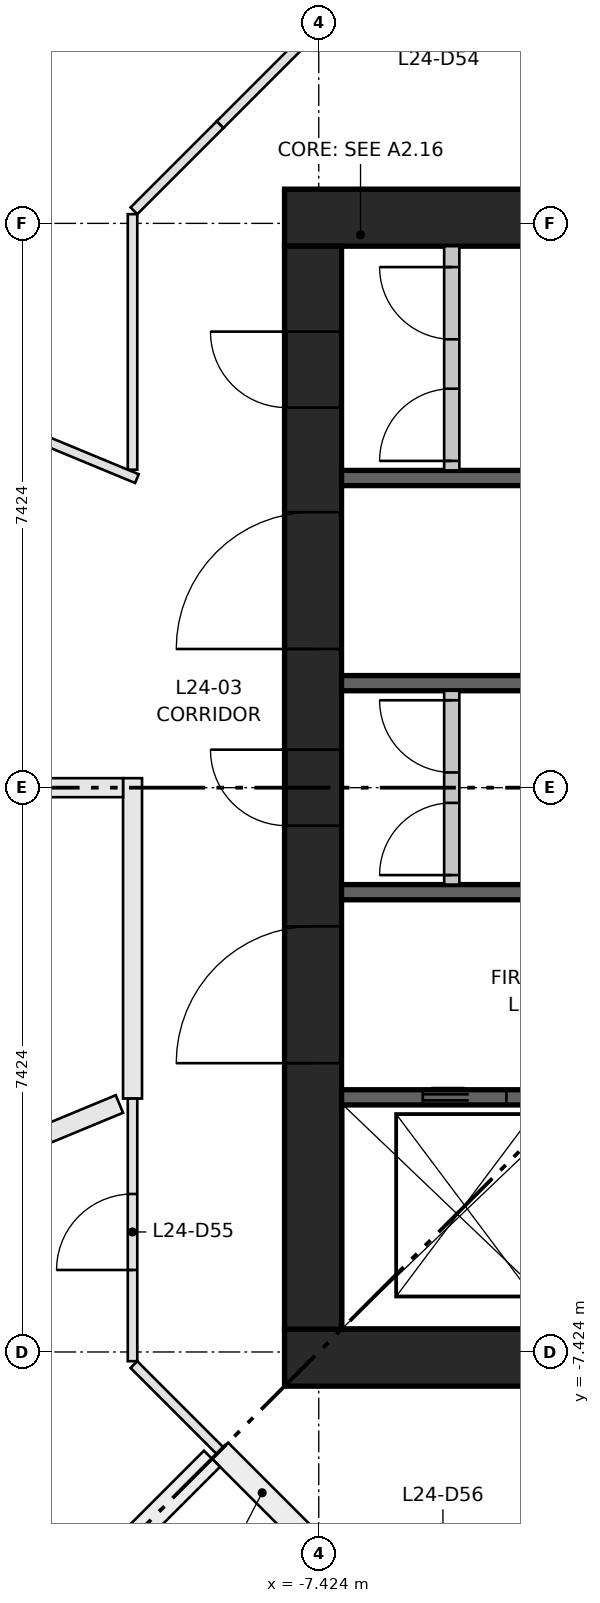
"""IFC4 building model, lengths in metres.
Left out: names, types, materials, properties, quantities, classifications, styles, units other than length and angle.
Written with IfcOpenShell. Run it as: python <this file> out.ifc"""

import sys

from ifc_helpers import new_model, si_unit, direction, frame, frame_2d, origin, place, context, subcontext, project, spatial, rectangle, extrude, element, fill, save


model = new_model("IFC4")
c1 = context("Model", 3, precision=1e-05, world=origin(), true_north=direction((0.0, 1.0)))
c2 = subcontext(c1, "Body", "Model", "MODEL_VIEW")
j1 = project(units=[si_unit("LENGTHUNIT", "METRE"), si_unit("PLANEANGLEUNIT", "RADIAN")], contexts=[c1])
p1 = place(None, origin())
s1 = spatial("IfcSite", under=j1, at=p1, CompositionType="ELEMENT")
p2 = place(p1, origin())
s2 = spatial("IfcBuilding", under=s1, at=p2, CompositionType="ELEMENT")
p3 = place(p2, frame((0.0, 0.0, 94.65)))
s3 = spatial("IfcBuildingStorey", under=s2, at=p3, CompositionType="ELEMENT", Elevation=94.65)
for number, where, z_axis, x_axis in (
    (1, (-7.874, -7.499, 0.0), (0.0, 0.0, 1.0), (1.0, 0.0, 0.0)),
    (2, (-7.874, 7.499, 0.0), (0.0, 0.0, 1.0), (1.0, 0.0, 0.0)),
):
    element("IfcWall", number, at=place(p3, frame(where, z_axis=z_axis, x_axis=x_axis)), inside=s3, PredefinedType="SHEAR", context=c2, shape_type="SweptSolid", body=[
        extrude(rectangle(XDim=15.748, YDim=0.75, at=frame_2d((7.874, 0.0))), origin(), (0.0, 0.0, 1.0), 3.65),
    ])
p4 = place(p3, frame((-7.499, -7.124, 0.0), z_axis=(0.0, 0.0, 1.0), x_axis=(0.0, 1.0, 0.0)))
e3 = element("IfcWall", 3, at=p4, inside=s3, PredefinedType="SHEAR", context=c2, shape_type="SweptSolid", body=[
    extrude(rectangle(XDim=14.248, YDim=0.75, at=frame_2d((7.124, 0.0))), origin(), (0.0, 0.0, 1.0), 3.65),
])
p5 = place(p4, frame((6.624, 0.0, 0.0)))
e4 = element("IfcOpeningElement", 4, at=p5, cuts=e3, PredefinedType="OPENING", context=c2, shape_type="SweptSolid", body=[
    extrude(rectangle(XDim=1.0, YDim=2.1, at=frame_2d((0.5, 1.05))), frame((0.0, 0.385, 0.0), z_axis=(0.0, -1.0, 0.0), x_axis=(1.0, 0.0, 0.0)), (0.0, 0.0, 1.0), 0.77),
])
p6 = place(p4, frame((3.5, 0.0, 0.0)))
e5 = element("IfcOpeningElement", 5, at=p6, cuts=e3, PredefinedType="OPENING", context=c2, shape_type="SweptSolid", body=[
    extrude(rectangle(XDim=1.8, YDim=2.1, at=frame_2d((0.9, 1.05))), frame((0.0, 0.385, 0.0), z_axis=(0.0, -1.0, 0.0), x_axis=(1.0, 0.0, 0.0)), (0.0, 0.0, 1.0), 0.77),
])
p7 = place(p4, frame((8.948, 0.0, 0.0)))
e6 = element("IfcOpeningElement", 6, at=p7, cuts=e3, PredefinedType="OPENING", context=c2, shape_type="SweptSolid", body=[
    extrude(rectangle(XDim=1.8, YDim=2.1, at=frame_2d((0.9, 1.05))), frame((0.0, 0.385, 0.0), z_axis=(0.0, -1.0, 0.0), x_axis=(1.0, 0.0, 0.0)), (0.0, 0.0, 1.0), 0.77),
])
p8 = place(p4, frame((12.124, 0.0, 0.0)))
e7 = element("IfcOpeningElement", 7, at=p8, cuts=e3, PredefinedType="OPENING", context=c2, shape_type="SweptSolid", body=[
    extrude(rectangle(XDim=1.0, YDim=2.1, at=frame_2d((0.5, 1.05))), frame((0.0, 0.385, 0.0), z_axis=(0.0, -1.0, 0.0), x_axis=(1.0, 0.0, 0.0)), (0.0, 0.0, 1.0), 0.77),
])
p9 = place(p3, frame((-7.124, -4.074, 0.0), z_axis=(0.0, 0.0, 1.0), x_axis=(1.0, 0.0, 0.0)))
e8 = element("IfcWall", 8, at=p9, inside=s3, PredefinedType="SHEAR", context=c2, shape_type="SweptSolid", body=[
    extrude(rectangle(XDim=14.248, YDim=0.2, at=frame_2d((7.124, 0.0))), origin(), (0.0, 0.0, 1.0), 3.3),
])
p10 = place(p9, frame((1.069, 0.0, 0.0)))
e9 = element("IfcOpeningElement", 9, at=p10, cuts=e8, PredefinedType="OPENING", context=c2, shape_type="SweptSolid", body=[
    extrude(rectangle(XDim=1.1, YDim=2.1, at=frame_2d((0.55, 1.05))), frame((0.0, 0.11, 0.0), z_axis=(0.0, -1.0, 0.0), x_axis=(1.0, 0.0, 0.0)), (0.0, 0.0, 1.0), 0.22),
])
p11 = place(p9, frame((4.206, 0.0, 0.0)))
e10 = element("IfcOpeningElement", 10, at=p11, cuts=e8, PredefinedType="OPENING", context=c2, shape_type="SweptSolid", body=[
    extrude(rectangle(XDim=1.1, YDim=2.1, at=frame_2d((0.55, 1.05))), frame((0.0, 0.11, 0.0), z_axis=(0.0, -1.0, 0.0), x_axis=(1.0, 0.0, 0.0)), (0.0, 0.0, 1.0), 0.22),
])
p12 = place(p9, frame((6.808, 0.0, 0.0)))
e11 = element("IfcOpeningElement", 11, at=p12, cuts=e8, PredefinedType="OPENING", context=c2, shape_type="SweptSolid", body=[
    extrude(rectangle(XDim=1.0, YDim=2.1, at=frame_2d((0.5, 1.05))), frame((0.0, 0.11, 0.0), z_axis=(0.0, -1.0, 0.0), x_axis=(1.0, 0.0, 0.0)), (0.0, 0.0, 1.0), 0.22),
])
p13 = place(p9, frame((8.777, 0.0, 0.0)))
e12 = element("IfcOpeningElement", 12, at=p13, cuts=e8, PredefinedType="OPENING", context=c2, shape_type="SweptSolid", body=[
    extrude(rectangle(XDim=1.0, YDim=2.1, at=frame_2d((0.5, 1.05))), frame((0.0, 0.11, 0.0), z_axis=(0.0, -1.0, 0.0), x_axis=(1.0, 0.0, 0.0)), (0.0, 0.0, 1.0), 0.22),
])
p14 = place(p9, frame((10.745, 0.0, 0.0)))
e13 = element("IfcOpeningElement", 13, at=p14, cuts=e8, PredefinedType="OPENING", context=c2, shape_type="SweptSolid", body=[
    extrude(rectangle(XDim=1.0, YDim=2.1, at=frame_2d((0.5, 1.05))), frame((0.0, 0.11, 0.0), z_axis=(0.0, -1.0, 0.0), x_axis=(1.0, 0.0, 0.0)), (0.0, 0.0, 1.0), 0.22),
])
p15 = place(p9, frame((12.714, 0.0, 0.0)))
e14 = element("IfcOpeningElement", 14, at=p15, cuts=e8, PredefinedType="OPENING", context=c2, shape_type="SweptSolid", body=[
    extrude(rectangle(XDim=1.0, YDim=2.1, at=frame_2d((0.5, 1.05))), frame((0.0, 0.11, 0.0), z_axis=(0.0, -1.0, 0.0), x_axis=(1.0, 0.0, 0.0)), (0.0, 0.0, 1.0), 0.22),
])
p16 = place(p3, frame((-7.124, 4.074, 0.0), z_axis=(0.0, 0.0, 1.0), x_axis=(1.0, 0.0, 0.0)))
e15 = element("IfcWall", 15, at=p16, inside=s3, PredefinedType="SHEAR", context=c2, shape_type="SweptSolid", body=[
    extrude(rectangle(XDim=7.124, YDim=0.2, at=frame_2d((3.562, 0.0))), origin(), (0.0, 0.0, 1.0), 3.3),
])
for number, where, z_axis, x_axis in (
    (16, (-7.124, -1.375, 0.0), (0.0, 0.0, 1.0), (1.0, 0.0, 0.0)),
    (17, (-7.124, 1.375, 0.0), (0.0, 0.0, 1.0), (1.0, 0.0, 0.0)),
):
    element("IfcWall", number, at=place(p3, frame(where, z_axis=z_axis, x_axis=x_axis)), inside=s3, PredefinedType="SHEAR", context=c2, shape_type="SweptSolid", body=[
        extrude(rectangle(XDim=2.75, YDim=0.2, at=frame_2d((1.375, 0.0))), origin(), (0.0, 0.0, 1.0), 3.3),
    ])
p17 = place(p3, frame((-5.674, -1.275, 0.0), z_axis=(0.0, 0.0, 1.0), x_axis=(0.0, 1.0, 0.0)))
e18 = element("IfcWall", 18, at=p17, inside=s3, PredefinedType="PARTITIONING", context=c2, shape_type="SweptSolid", body=[
    extrude(rectangle(XDim=2.55, YDim=0.2, at=frame_2d((1.275, 0.0))), origin(), (0.0, 0.0, 1.0), 3.3),
])
p18 = place(p17, frame((0.125, 0.0, 0.0)))
e19 = element("IfcOpeningElement", 19, at=p18, cuts=e18, PredefinedType="OPENING", context=c2, shape_type="SweptSolid", body=[
    extrude(rectangle(XDim=0.95, YDim=2.1, at=frame_2d((0.475, 1.05))), frame((0.0, 0.11, 0.0), z_axis=(0.0, -1.0, 0.0), x_axis=(1.0, 0.0, 0.0)), (0.0, 0.0, 1.0), 0.22),
])
p19 = place(p17, frame((1.475, 0.0, 0.0)))
e20 = element("IfcOpeningElement", 20, at=p19, cuts=e18, PredefinedType="OPENING", context=c2, shape_type="SweptSolid", body=[
    extrude(rectangle(XDim=0.95, YDim=2.1, at=frame_2d((0.475, 1.05))), frame((0.0, 0.11, 0.0), z_axis=(0.0, -1.0, 0.0), x_axis=(1.0, 0.0, 0.0)), (0.0, 0.0, 1.0), 0.22),
])
p20 = place(p3, frame((-5.674, 4.174, 0.0), z_axis=(0.0, 0.0, 1.0), x_axis=(0.0, 1.0, 0.0)))
e21 = element("IfcWall", 21, at=p20, inside=s3, PredefinedType="PARTITIONING", context=c2, shape_type="SweptSolid", body=[
    extrude(rectangle(XDim=2.95, YDim=0.2, at=frame_2d((1.475, 0.0))), origin(), (0.0, 0.0, 1.0), 3.3),
])
p21 = place(p20, frame((0.125, 0.0, 0.0)))
e22 = element("IfcOpeningElement", 22, at=p21, cuts=e21, PredefinedType="OPENING", context=c2, shape_type="SweptSolid", body=[
    extrude(rectangle(XDim=0.95, YDim=2.1, at=frame_2d((0.475, 1.05))), frame((0.0, 0.11, 0.0), z_axis=(0.0, -1.0, 0.0), x_axis=(1.0, 0.0, 0.0)), (0.0, 0.0, 1.0), 0.22),
])
p22 = place(p20, frame((1.725, 0.0, 0.0)))
e23 = element("IfcOpeningElement", 23, at=p22, cuts=e21, PredefinedType="OPENING", context=c2, shape_type="SweptSolid", body=[
    extrude(rectangle(XDim=0.95, YDim=2.1, at=frame_2d((0.475, 1.05))), frame((0.0, 0.11, 0.0), z_axis=(0.0, -1.0, 0.0), x_axis=(1.0, 0.0, 0.0)), (0.0, 0.0, 1.0), 0.22),
])
p23 = place(p3, frame((-8.722, 8.722, 0.0), z_axis=(0.0, 0.0, 1.0), x_axis=(0.707030604857, 0.70718294931, 0.0)))
e24 = element("IfcWall", 24, at=p23, inside=s3, PredefinedType="PARTITIONING", context=c2, shape_type="SweptSolid", body=[
    extrude(rectangle(XDim=1.603, YDim=0.125, at=frame_2d((0.801, 0.0))), origin(), (0.0, 0.0, 1.0), 3.3),
])
p24 = place(p3, frame((-9.874, 4.183, 0.0), z_axis=(0.0, 0.0, 1.0), x_axis=(0.0, 1.0, 0.0)))
e25 = element("IfcWall", 25, at=p24, inside=s3, PredefinedType="PARTITIONING", context=c2, shape_type="SweptSolid", body=[
    extrude(rectangle(XDim=3.362, YDim=0.125, at=frame_2d((1.681, 0.0))), origin(), (0.0, 0.0, 1.0), 3.3),
])
p25 = place(p3, frame((-9.856, 7.589, 0.0), z_axis=(0.0, 0.0, 1.0), x_axis=(0.70718294931, 0.707030604857, 0.0)))
e26 = element("IfcWall", 26, at=p25, inside=s3, PredefinedType="PARTITIONING", context=c2, shape_type="SweptSolid", body=[
    extrude(rectangle(XDim=1.603, YDim=0.125, at=frame_2d((0.801, 0.0))), origin(), (0.0, 0.0, 1.0), 3.3),
])
p26 = place(p3, frame((-9.874, -4.09, 0.0), z_axis=(0.0, 0.0, 1.0), x_axis=(0.0, 1.0, 0.0)))
e27 = element("IfcWall", 27, at=p26, inside=s3, PredefinedType="PARTITIONING", context=c2, shape_type="SweptSolid", body=[
    extrude(rectangle(XDim=4.215, YDim=0.25, at=frame_2d((2.107, 0.0))), origin(), (0.0, 0.0, 1.0), 3.3),
])
p27 = place(p3, frame((-9.874, -7.545, 0.0), z_axis=(0.0, 0.0, 1.0), x_axis=(0.0, 1.0, 0.0)))
e28 = element("IfcWall", 28, at=p27, inside=s3, PredefinedType="PARTITIONING", context=c2, shape_type="SweptSolid", body=[
    extrude(rectangle(XDim=3.455, YDim=0.125, at=frame_2d((1.728, 0.0))), origin(), (0.0, 0.0, 1.0), 3.3),
])
p28 = place(p27, frame((1.2, 0.0, 0.0)))
e29 = element("IfcOpeningElement", 29, at=p28, cuts=e28, PredefinedType="OPENING", context=c2, shape_type="SweptSolid", body=[
    extrude(rectangle(XDim=1.0, YDim=2.1, at=frame_2d((0.5, 1.05))), frame((0.0, 0.073, 0.0), z_axis=(0.0, -1.0, 0.0), x_axis=(1.0, 0.0, 0.0)), (0.0, 0.0, 1.0), 0.145),
])
p29 = place(p3, frame((-8.722, -8.722, 0.0), z_axis=(0.0, 0.0, 1.0), x_axis=(-0.70718294931, 0.707030604857, 0.0)))
e30 = element("IfcWall", 30, at=p29, inside=s3, PredefinedType="PARTITIONING", context=c2, shape_type="SweptSolid", body=[
    extrude(rectangle(XDim=1.603, YDim=0.125, at=frame_2d((0.801, 0.0))), origin(), (0.0, 0.0, 1.0), 3.3),
])
p30 = place(p3, frame((-7.615, -9.83, 0.0), z_axis=(0.0, 0.0, 1.0), x_axis=(-0.707028841614, 0.70718471217, 0.0)))
e31 = element("IfcWall", 31, at=p30, inside=s3, PredefinedType="PARTITIONING", context=c2, shape_type="SweptSolid", body=[
    extrude(rectangle(XDim=1.566, YDim=0.3, at=frame_2d((0.783, 0.0))), origin(), (0.0, 0.0, 1.0), 3.3),
])
p31 = place(p3, frame((-9.816, 4.066, 0.0), z_axis=(0.0, 0.0, 1.0), x_axis=(-0.923867212496, 0.382713174158, 0.0)))
e32 = element("IfcWall", 32, at=p31, inside=s3, PredefinedType="PARTITIONING", context=c2, shape_type="SweptSolid", body=[
    extrude(rectangle(XDim=4.495, YDim=0.125, at=frame_2d((2.248, 0.0))), origin(), (0.0, 0.0, 1.0), 3.3),
])
p32 = place(p3, frame((-9.999, 0.0, 0.0), z_axis=(0.0, 0.0, 1.0), x_axis=(-1.0, 0.0, 0.0)))
e33 = element("IfcWall", 33, at=p32, inside=s3, PredefinedType="PARTITIONING", context=c2, shape_type="SweptSolid", body=[
    extrude(rectangle(XDim=5.121, YDim=0.25, at=frame_2d((2.561, 0.0))), origin(), (0.0, 0.0, 1.0), 3.3),
])
p33 = place(p32, frame((2.1, 0.0, 0.0)))
e34 = element("IfcOpeningElement", 34, at=p33, cuts=e33, PredefinedType="OPENING", context=c2, shape_type="SweptSolid", body=[
    extrude(rectangle(XDim=1.0, YDim=2.1, at=frame_2d((0.5, 1.05))), frame((0.0, 0.135, 0.0), z_axis=(0.0, -1.0, 0.0), x_axis=(1.0, 0.0, 0.0)), (0.0, 0.0, 1.0), 0.27),
])
p34 = place(p3, frame((-10.047, -4.162, 0.0), z_axis=(0.0, 0.0, 1.0), x_axis=(-0.923886463326, -0.382666699469, 0.0)))
e35 = element("IfcWall", 35, at=p34, inside=s3, PredefinedType="PARTITIONING", context=c2, shape_type="SweptSolid", body=[
    extrude(rectangle(XDim=4.245, YDim=0.25, at=frame_2d((2.123, 0.0))), origin(), (0.0, 0.0, 1.0), 3.3),
])
p35 = place(p3, frame((-12.792, -12.792, 0.0), z_axis=(0.0, 0.0, 1.0), x_axis=(0.707106781187, 0.707106781187, 0.0)))
e36 = element("IfcWall", 36, at=p35, inside=s3, PredefinedType="PARTITIONING", context=c2, shape_type="SweptSolid", body=[
    extrude(rectangle(XDim=5.604, YDim=0.3, at=frame_2d((2.802, 0.0))), origin(), (0.0, 0.0, 1.0), 3.3),
])
p36 = place(p10, origin())
e37 = element("IfcDoor", 37, at=p36, inside=s3, OperationType="DOUBLE_DOOR_SLIDING", PredefinedType="DOOR", context=c2, shape_type="SweptSolid", body=[
    extrude(rectangle(XDim=1.1, YDim=2.1, at=frame_2d((0.55, 1.05))), frame((0.0, 0.025, 0.0), z_axis=(0.0, -1.0, 0.0), x_axis=(1.0, 0.0, 0.0)), (0.0, 0.0, 1.0), 0.05),
])
fill(e9, e37)
p37 = place(p18, origin())
e38 = element("IfcDoor", 38, at=p37, inside=s3, OperationType="SINGLE_SWING_LEFT", PredefinedType="DOOR", context=c2, shape_type="SweptSolid", body=[
    extrude(rectangle(XDim=0.95, YDim=2.1, at=frame_2d((0.475, 1.05))), frame((0.0, 0.025, 0.0), z_axis=(0.0, -1.0, 0.0), x_axis=(1.0, 0.0, 0.0)), (0.0, 0.0, 1.0), 0.05),
])
fill(e19, e38)
p38 = place(p19, origin())
e39 = element("IfcDoor", 39, at=p38, inside=s3, OperationType="SINGLE_SWING_RIGHT", PredefinedType="DOOR", context=c2, shape_type="SweptSolid", body=[
    extrude(rectangle(XDim=0.95, YDim=2.1, at=frame_2d((0.475, 1.05))), frame((0.0, 0.025, 0.0), z_axis=(0.0, -1.0, 0.0), x_axis=(1.0, 0.0, 0.0)), (0.0, 0.0, 1.0), 0.05),
])
fill(e20, e39)
p39 = place(p21, origin())
e40 = element("IfcDoor", 40, at=p39, inside=s3, OperationType="SINGLE_SWING_LEFT", PredefinedType="DOOR", context=c2, shape_type="SweptSolid", body=[
    extrude(rectangle(XDim=0.95, YDim=2.1, at=frame_2d((0.475, 1.05))), frame((0.0, 0.025, 0.0), z_axis=(0.0, -1.0, 0.0), x_axis=(1.0, 0.0, 0.0)), (0.0, 0.0, 1.0), 0.05),
])
fill(e22, e40)
p40 = place(p22, origin())
e41 = element("IfcDoor", 41, at=p40, inside=s3, OperationType="SINGLE_SWING_RIGHT", PredefinedType="DOOR", context=c2, shape_type="SweptSolid", body=[
    extrude(rectangle(XDim=0.95, YDim=2.1, at=frame_2d((0.475, 1.05))), frame((0.0, 0.025, 0.0), z_axis=(0.0, -1.0, 0.0), x_axis=(1.0, 0.0, 0.0)), (0.0, 0.0, 1.0), 0.05),
])
fill(e23, e41)
p41 = place(p5, origin())
e42 = element("IfcDoor", 42, at=p41, inside=s3, OperationType="SINGLE_SWING_RIGHT", PredefinedType="DOOR", context=c2, shape_type="SweptSolid", body=[
    extrude(rectangle(XDim=1.0, YDim=2.1, at=frame_2d((0.5, 1.05))), frame((0.0, 0.375, 0.0), z_axis=(0.0, -1.0, 0.0), x_axis=(1.0, 0.0, 0.0)), (0.0, 0.0, 1.0), 0.05),
])
fill(e4, e42)
p42 = place(p6, origin())
e43 = element("IfcDoor", 43, at=p42, inside=s3, OperationType="DOUBLE_DOOR_SINGLE_SWING", PredefinedType="DOOR", context=c2, shape_type="SweptSolid", body=[
    extrude(rectangle(XDim=1.8, YDim=2.1, at=frame_2d((0.9, 1.05))), frame((0.0, 0.025, 0.0), z_axis=(0.0, -1.0, 0.0), x_axis=(1.0, 0.0, 0.0)), (0.0, 0.0, 1.0), 0.05),
])
fill(e5, e43)
p43 = place(p7, origin())
e44 = element("IfcDoor", 44, at=p43, inside=s3, OperationType="DOUBLE_DOOR_SINGLE_SWING", PredefinedType="DOOR", context=c2, shape_type="SweptSolid", body=[
    extrude(rectangle(XDim=1.8, YDim=2.1, at=frame_2d((0.9, 1.05))), frame((0.0, 0.025, 0.0), z_axis=(0.0, -1.0, 0.0), x_axis=(1.0, 0.0, 0.0)), (0.0, 0.0, 1.0), 0.05),
])
fill(e6, e44)
p44 = place(p8, origin())
e45 = element("IfcDoor", 45, at=p44, inside=s3, OperationType="SINGLE_SWING_RIGHT", PredefinedType="DOOR", context=c2, shape_type="SweptSolid", body=[
    extrude(rectangle(XDim=1.0, YDim=2.1, at=frame_2d((0.5, 1.05))), frame((0.0, 0.375, 0.0), z_axis=(0.0, -1.0, 0.0), x_axis=(1.0, 0.0, 0.0)), (0.0, 0.0, 1.0), 0.05),
])
fill(e7, e45)
p45 = place(p28, origin())
e46 = element("IfcDoor", 46, at=p45, inside=s3, OperationType="SINGLE_SWING_LEFT", PredefinedType="DOOR", context=c2, shape_type="SweptSolid", body=[
    extrude(rectangle(XDim=1.0, YDim=2.1, at=frame_2d((0.5, 1.05))), frame((0.0, 0.025, 0.0), z_axis=(0.0, -1.0, 0.0), x_axis=(1.0, 0.0, 0.0)), (0.0, 0.0, 1.0), 0.05),
])
fill(e29, e46)
save(model, sys.argv[1])
